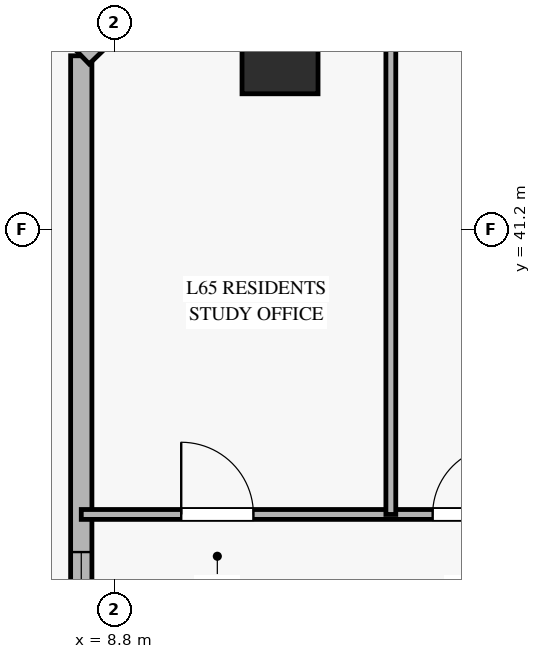
"""IFC4 building model, lengths in metres.
Left out: names, types, materials, properties, quantities, classifications, styles, units other than length and angle.
Written with IfcOpenShell. Run it as: python <this file> out.ifc"""

import sys

from ifc_helpers import new_model, si_unit, direction, frame, frame_2d, origin, origin_2d, place, context, subcontext, project, spatial, rectangle, hollow_rectangle, extrude, source, transform, mapped, element, fill, save


model = new_model("IFC4")
c1 = context("Model", 3, precision=1e-05, world=origin(), true_north=direction((0.0, 1.0)))
c2 = subcontext(c1, "Body", "Model", "MODEL_VIEW")
j1 = project(units=[si_unit("LENGTHUNIT", "METRE"), si_unit("PLANEANGLEUNIT", "RADIAN")], contexts=[c1])
p1 = place(None, origin())
s1 = spatial("IfcSite", under=j1, at=p1, CompositionType="ELEMENT")
p2 = place(p1, origin())
s2 = spatial("IfcBuilding", under=s1, at=p2, CompositionType="ELEMENT")
p3 = place(p2, frame((0.0, 0.0, 255.3)))
s3 = spatial("IfcBuildingStorey", under=s2, at=p3, CompositionType="ELEMENT", Elevation=255.3)
m1 = source(origin(), c2, "Body", "SweptSolid", [
    extrude(hollow_rectangle(XDim=1.0, YDim=1.0, WallThickness=0.045, at=origin_2d()), origin(), (0.0, 0.0, 1.0), 3.207),
])
p4 = place(p3, frame((10.979, 43.485, 0.0), z_axis=(0.115040541167, 0.014008907726, 0.993262011955), x_axis=(-0.12088069872, 0.992667042203, 0.0)))
e1 = element("IfcColumn", 1, at=p4, inside=s3, PredefinedType="COLUMN", context=c2, shape_type="MappedRepresentation", body=[
    mapped(m1, transform((0.0, 0.0, 0.0), x_axis=(1.0, 0.0, 0.0), y_axis=(0.0, 1.0, 0.0), z_axis=(0.0, 0.0, 1.0), scale=1.0)),
])
p5 = place(p3, frame((8.364, 30.857, 0.0), z_axis=(0.0, 0.0, 1.0), x_axis=(0.0, 1.0, 0.0)))
e2 = element("IfcWall", 2, at=p5, inside=s3, PredefinedType="SOLIDWALL", context=c2, shape_type="SweptSolid", body=[
    extrude(rectangle(XDim=12.628, YDim=0.28, at=frame_2d((6.314, 0.0))), origin(), (0.0, 0.0, 1.0), 2.815),
])
p6 = place(p5, frame((4.498, 0.0, 0.45)))
e3 = element("IfcOpeningElement", 3, at=p6, cuts=e2, PredefinedType="OPENING", context=c2, shape_type="SweptSolid", body=[
    extrude(rectangle(XDim=1.6, YDim=2.0, at=frame_2d((0.8, 1.0))), frame((0.0, 0.15, 0.0), z_axis=(0.0, -1.0, 0.0), x_axis=(1.0, 0.0, 0.0)), (0.0, 0.0, 1.0), 0.3),
])
p7 = place(p3, frame((11.229, 46.25, 0.0), z_axis=(0.0, 0.0, 1.0), x_axis=(-0.719565206503, -0.694424879731, 0.0)))
e4 = element("IfcWall", 4, at=p7, inside=s3, PredefinedType="SOLIDWALL", context=c2, shape_type="SweptSolid", body=[
    extrude(rectangle(XDim=3.981, YDim=0.3, at=frame_2d((1.991, 0.0))), origin(), (0.0, 0.0, 1.0), 2.815),
])
p8 = place(p7, frame((1.191, 0.0, 0.45)))
e5 = element("IfcOpeningElement", 5, at=p8, cuts=e4, PredefinedType="OPENING", context=c2, shape_type="SweptSolid", body=[
    extrude(rectangle(XDim=1.6, YDim=2.0, at=frame_2d((0.8, 1.0))), frame((0.0, 0.16, 0.0), z_axis=(0.0, -1.0, 0.0), x_axis=(1.0, 0.0, 0.0)), (0.0, 0.0, 1.0), 0.32),
])
p9 = place(p3, frame((8.364, 37.45, 0.0), z_axis=(0.0, 0.0, 1.0), x_axis=(1.0, 0.0, 0.0)))
e6 = element("IfcWall", 6, at=p9, inside=s3, PredefinedType="PARTITIONING", context=c2, shape_type="SweptSolid", body=[
    extrude(rectangle(XDim=10.886, YDim=0.13, at=frame_2d((5.443, 0.0))), origin(), (0.0, 0.0, 1.0), 2.82),
])
p10 = place(p9, frame((1.315, 0.0, 0.0)))
e7 = element("IfcOpeningElement", 7, at=p10, cuts=e6, PredefinedType="OPENING", context=c2, shape_type="SweptSolid", body=[
    extrude(rectangle(XDim=0.95, YDim=2.1, at=frame_2d((0.475, 1.05))), frame((0.0, 0.075, 0.0), z_axis=(0.0, -1.0, 0.0), x_axis=(1.0, 0.0, 0.0)), (0.0, 0.0, 1.0), 0.15),
])
p11 = place(p9, frame((4.623, 0.0, 0.0)))
e8 = element("IfcOpeningElement", 8, at=p11, cuts=e6, PredefinedType="OPENING", context=c2, shape_type="SweptSolid", body=[
    extrude(rectangle(XDim=0.9, YDim=2.1, at=frame_2d((0.45, 1.05))), frame((0.0, 0.075, 0.0), z_axis=(0.0, -1.0, 0.0), x_axis=(1.0, 0.0, 0.0)), (0.0, 0.0, 1.0), 0.15),
])
p12 = place(p3, frame((12.437, 37.45, 0.0), z_axis=(0.0, 0.0, 1.0), x_axis=(0.0, 1.0, 0.0)))
e9 = element("IfcWall", 9, at=p12, inside=s3, PredefinedType="PARTITIONING", context=c2, shape_type="SweptSolid", body=[
    extrude(rectangle(XDim=8.8, YDim=0.13, at=frame_2d((4.4, 0.0))), origin(), (0.0, 0.0, 1.0), 3.185),
])
m2 = source(origin(), c2, "Body", "SweptSolid", [
    extrude(rectangle(XDim=1.6, YDim=2.0, at=frame_2d((0.8, 1.0))), frame((0.0, 0.03, 0.0), z_axis=(0.0, -1.0, 0.0), x_axis=(1.0, 0.0, 0.0)), (0.0, 0.0, 1.0), 0.06),
])
p13 = place(p6, origin())
e10 = element("IfcWindow", 10, at=p13, inside=s3, PartitioningType="SINGLE_PANEL", PredefinedType="WINDOW", context=c2, shape_type="MappedRepresentation", body=[
    mapped(m2, transform((0.0, 0.0, 0.0), x_axis=(1.0, 0.0, 0.0), y_axis=(0.0, 1.0, 0.0), z_axis=(0.0, 0.0, 1.0), scale=1.0)),
])
fill(e3, e10)
m3 = source(origin(), c2, "Body", "SweptSolid", [
    extrude(rectangle(XDim=0.95, YDim=2.1, at=frame_2d((0.475, 1.05))), frame((0.0, 0.025, 0.0), z_axis=(0.0, -1.0, 0.0), x_axis=(1.0, 0.0, 0.0)), (0.0, 0.0, 1.0), 0.05),
])
p14 = place(p10, origin())
e11 = element("IfcDoor", 11, at=p14, inside=s3, OperationType="SINGLE_SWING_LEFT", PredefinedType="DOOR", context=c2, shape_type="MappedRepresentation", body=[
    mapped(m3, transform((0.0, 0.0, 0.0), x_axis=(1.0, 0.0, 0.0), y_axis=(0.0, 1.0, 0.0), z_axis=(0.0, 0.0, 1.0), scale=1.0)),
])
fill(e7, e11)
m4 = source(origin(), c2, "Body", "SweptSolid", [
    extrude(rectangle(XDim=0.9, YDim=2.1, at=frame_2d((0.45, 1.05))), frame((0.0, 0.025, 0.0), z_axis=(0.0, -1.0, 0.0), x_axis=(1.0, 0.0, 0.0)), (0.0, 0.0, 1.0), 0.05),
])
p15 = place(p11, origin())
e12 = element("IfcDoor", 12, at=p15, inside=s3, OperationType="SINGLE_SWING_RIGHT", PredefinedType="DOOR", context=c2, shape_type="MappedRepresentation", body=[
    mapped(m4, transform((0.0, 0.0, 0.0), x_axis=(1.0, 0.0, 0.0), y_axis=(0.0, 1.0, 0.0), z_axis=(0.0, 0.0, 1.0), scale=1.0)),
])
fill(e8, e12)
save(model, sys.argv[1])
